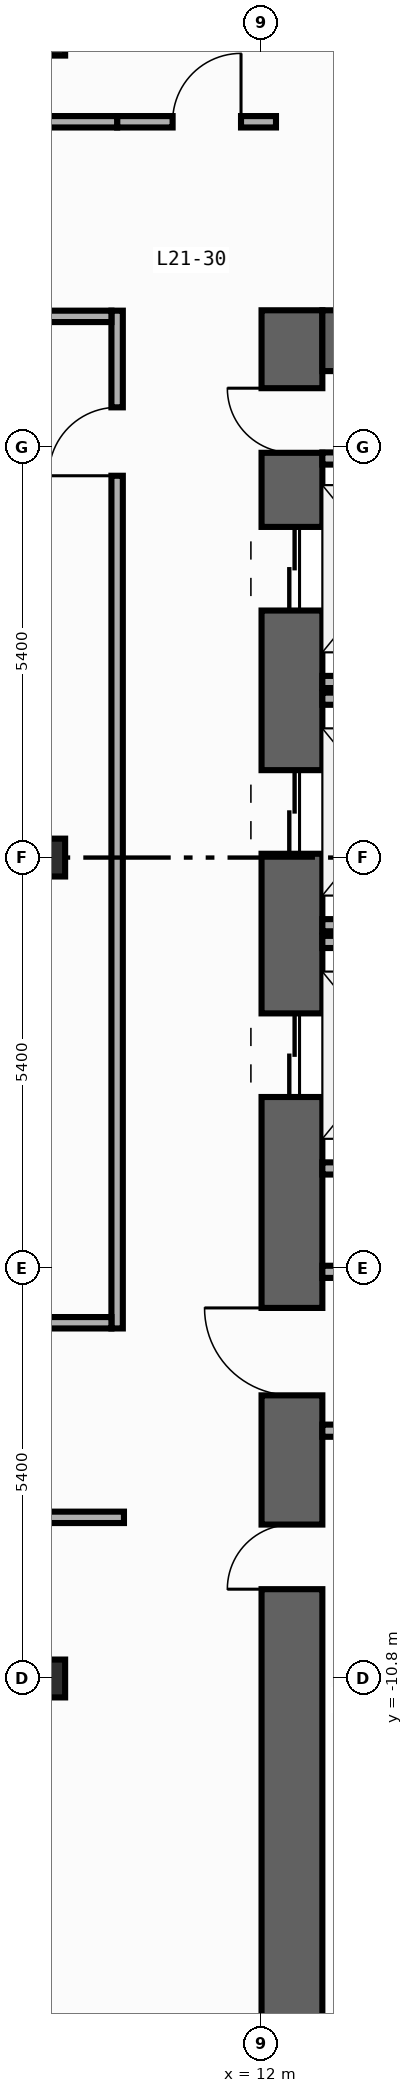
"""IFC4 building model, lengths in metres.
Left out: names, types, materials, properties, quantities, classifications, styles, units other than length and angle.
Written with IfcOpenShell. Run it as: python <this file> out.ifc"""

import sys

from ifc_helpers import new_model, si_unit, direction, frame, frame_2d, origin, origin_2d, place, context, subcontext, project, spatial, rectangle, i_section, extrude, element, fill, save


model = new_model("IFC4")
c1 = context("Model", 3, precision=1e-05, world=origin(), true_north=direction((0.0, 1.0)))
c2 = subcontext(c1, "Body", "Model", "MODEL_VIEW")
j1 = project(units=[si_unit("LENGTHUNIT", "METRE"), si_unit("PLANEANGLEUNIT", "RADIAN")], contexts=[c1])
p1 = place(None, origin())
s1 = spatial("IfcSite", under=j1, at=p1, CompositionType="ELEMENT")
p2 = place(p1, origin())
s2 = spatial("IfcBuilding", under=s1, at=p2, CompositionType="ELEMENT")
p3 = place(p2, frame((0.0, 0.0, 93.2)))
s3 = spatial("IfcBuildingStorey", under=s2, at=p3, CompositionType="ELEMENT", Elevation=93.2)
p4 = place(p3, frame((12.4, -19.8, 0.0), z_axis=(0.0, 0.0, 1.0), x_axis=(0.0, 1.0, 0.0)))
e1 = element("IfcWall", 1, at=p4, inside=s3, PredefinedType="SHEAR", context=c2, shape_type="SweptSolid", body=[
    extrude(rectangle(XDim=27.0, YDim=0.8, at=frame_2d((13.5, 0.0))), origin(), (0.0, 0.0, 1.0), 3.94),
])
p5 = place(p4, frame((23.05, 0.0, 0.0)))
e2 = element("IfcOpeningElement", 2, at=p5, cuts=e1, PredefinedType="OPENING", context=c2, shape_type="SweptSolid", body=[
    extrude(rectangle(XDim=1.1, YDim=2.2, at=frame_2d((0.55, 1.1))), frame((0.0, 0.41, 0.0), z_axis=(0.0, -1.0, 0.0), x_axis=(1.0, 0.0, 0.0)), (0.0, 0.0, 1.0), 0.82),
])
p6 = place(p4, frame((19.85, 0.0, 0.0)))
e3 = element("IfcOpeningElement", 3, at=p6, cuts=e1, PredefinedType="OPENING", context=c2, shape_type="SweptSolid", body=[
    extrude(rectangle(XDim=1.1, YDim=2.2, at=frame_2d((0.55, 1.1))), frame((0.0, 0.41, 0.0), z_axis=(0.0, -1.0, 0.0), x_axis=(1.0, 0.0, 0.0)), (0.0, 0.0, 1.0), 0.82),
])
p7 = place(p4, frame((16.65, 0.0, 0.0)))
e4 = element("IfcOpeningElement", 4, at=p7, cuts=e1, PredefinedType="OPENING", context=c2, shape_type="SweptSolid", body=[
    extrude(rectangle(XDim=1.1, YDim=2.2, at=frame_2d((0.55, 1.1))), frame((0.0, 0.41, 0.0), z_axis=(0.0, -1.0, 0.0), x_axis=(1.0, 0.0, 0.0)), (0.0, 0.0, 1.0), 0.82),
])
p8 = place(p4, frame((10.175, 0.0, 0.0)))
e5 = element("IfcOpeningElement", 5, at=p8, cuts=e1, PredefinedType="OPENING", context=c2, shape_type="SweptSolid", body=[
    extrude(rectangle(XDim=0.85, YDim=2.1, at=frame_2d((0.425, 1.05))), frame((0.0, 0.41, 0.0), z_axis=(0.0, -1.0, 0.0), x_axis=(1.0, 0.0, 0.0)), (0.0, 0.0, 1.0), 0.82),
])
p9 = place(p4, frame((12.725, 0.0, 0.0)))
e6 = element("IfcOpeningElement", 6, at=p9, cuts=e1, PredefinedType="OPENING", context=c2, shape_type="SweptSolid", body=[
    extrude(rectangle(XDim=1.15, YDim=2.2, at=frame_2d((0.575, 1.1))), frame((0.0, 0.41, 0.0), z_axis=(0.0, -1.0, 0.0), x_axis=(1.0, 0.0, 0.0)), (0.0, 0.0, 1.0), 0.82),
])
p10 = place(p4, frame((25.125, 0.0, 0.0)))
e7 = element("IfcOpeningElement", 7, at=p10, cuts=e1, PredefinedType="OPENING", context=c2, shape_type="SweptSolid", body=[
    extrude(rectangle(XDim=0.85, YDim=2.1, at=frame_2d((0.425, 1.05))), frame((0.0, 0.41, 0.0), z_axis=(0.0, -1.0, 0.0), x_axis=(1.0, 0.0, 0.0)), (0.0, 0.0, 1.0), 0.82),
])
p11 = place(p3, frame((12.8, 6.8, 0.0), z_axis=(0.0, 0.0, 1.0), x_axis=(1.0, 0.0, 0.0)))
e8 = element("IfcWall", 8, at=p11, inside=s3, PredefinedType="SHEAR", context=c2, shape_type="SweptSolid", body=[
    extrude(rectangle(XDim=6.8, YDim=0.8, at=frame_2d((3.4, 0.0))), origin(), (0.0, 0.0, 1.0), 3.94),
])
for number, where, z_axis, x_axis in (
    (9, (9.2, -10.8, 0.0), (0.0, 0.0, 1.0), (1.0, 0.0, 0.0)),
    (10, (9.2, 0.0, 0.0), (0.0, 0.0, 1.0), (1.0, 0.0, 0.0)),
    (11, (9.2, 10.8, 0.0), (0.0, 0.0, 1.0), (1.0, 0.0, 0.0)),
):
    element("IfcColumn", number, at=place(p3, frame(where, z_axis=z_axis, x_axis=x_axis)), inside=s3, PredefinedType="COLUMN", context=c2, shape_type="SweptSolid", body=[
        extrude(i_section(OverallWidth=0.432, OverallDepth=0.498, WebThickness=0.045, FlangeThickness=0.07, FilletRadius=0.022, at=origin_2d()), origin(), (0.0, 0.0, 1.0), 4.2),
    ])
for number, where, z_axis, x_axis in (
    (12, (12.8, 2.31, 0.0), (0.0, 0.0, 1.0), (1.0, 0.0, 0.0)),
    (13, (12.8, -0.89, 0.0), (0.0, 0.0, 1.0), (1.0, 0.0, 0.0)),
    (14, (12.8, 2.09, 0.0), (0.0, 0.0, 1.0), (1.0, 0.0, 0.0)),
    (15, (12.8, -4.09, 0.0), (0.0, 0.0, 1.0), (1.0, 0.0, 0.0)),
    (16, (12.8, -1.11, 0.0), (0.0, 0.0, 1.0), (1.0, 0.0, 0.0)),
):
    element("IfcWall", number, at=place(p3, frame(where, z_axis=z_axis, x_axis=x_axis)), inside=s3, PredefinedType="STANDARD", context=c2, shape_type="SweptSolid", body=[
        extrude(rectangle(XDim=2.19, YDim=0.16, at=frame_2d((1.095, 0.0))), origin(), (0.0, 0.0, 1.0), 3.94),
    ])
for number, where, z_axis, x_axis in (
    (17, (12.8, -5.45, 0.0), (0.0, 0.0, 1.0), (1.0, 0.0, 0.0)),
    (18, (12.8, -7.54, 0.0), (0.0, 0.0, 1.0), (1.0, 0.0, 0.0)),
    (19, (12.8, 5.25, 0.0), (0.0, 0.0, 1.0), (1.0, 0.0, 0.0)),
):
    element("IfcWall", number, at=place(p3, frame(where, z_axis=z_axis, x_axis=x_axis)), inside=s3, PredefinedType="STANDARD", context=c2, shape_type="SweptSolid", body=[
        extrude(rectangle(XDim=2.6, YDim=0.16, at=frame_2d((1.3, 0.0))), origin(), (0.0, 0.0, 1.0), 3.94),
    ])
p12 = place(p3, frame((10.1, -6.195, 0.0), z_axis=(0.0, 0.0, 1.0), x_axis=(0.0, 1.0, 0.0)))
e20 = element("IfcWall", 20, at=p12, inside=s3, PredefinedType="PARTITIONING", context=c2, shape_type="SweptSolid", body=[
    extrude(rectangle(XDim=13.39, YDim=0.15, at=frame_2d((6.695, 0.0))), origin(), (0.0, 0.0, 1.0), 3.94),
])
p13 = place(p12, frame((11.218, 0.0, 0.0)))
e21 = element("IfcOpeningElement", 21, at=p13, cuts=e20, PredefinedType="OPENING", context=c2, shape_type="SweptSolid", body=[
    extrude(rectangle(XDim=0.9, YDim=2.15, at=frame_2d((0.45, 1.075))), frame((0.0, 0.085, 0.0), z_axis=(0.0, -1.0, 0.0), x_axis=(1.0, 0.0, 0.0)), (0.0, 0.0, 1.0), 0.17),
])
p14 = place(p3, frame((10.1, 9.68, 0.0), z_axis=(0.0, 0.0, 1.0), x_axis=(1.0, 0.0, 0.0)))
e22 = element("IfcWall", 22, at=p14, inside=s3, PredefinedType="PARTITIONING", context=c2, shape_type="SweptSolid", body=[
    extrude(rectangle(XDim=2.09, YDim=0.15, at=frame_2d((1.045, 0.0))), origin(), (0.0, 0.0, 1.0), 3.94),
])
p15 = place(p14, frame((0.73, 0.0, 0.0)))
e23 = element("IfcOpeningElement", 23, at=p15, cuts=e22, PredefinedType="OPENING", context=c2, shape_type="SweptSolid", body=[
    extrude(rectangle(XDim=0.9, YDim=2.15, at=frame_2d((0.45, 1.075))), frame((0.0, 0.085, 0.0), z_axis=(0.0, -1.0, 0.0), x_axis=(1.0, 0.0, 0.0)), (0.0, 0.0, 1.0), 0.17),
])
p16 = place(p3, frame((-9.085, 7.12, 0.0), z_axis=(0.0, 0.0, 1.0), x_axis=(1.0, 0.0, 0.0)))
e24 = element("IfcWall", 24, at=p16, inside=s3, PredefinedType="PARTITIONING", context=c2, shape_type="SweptSolid", body=[
    extrude(rectangle(XDim=19.11, YDim=0.15, at=frame_2d((9.555, 0.0))), origin(), (0.0, 0.0, 1.0), 3.94),
])
p17 = place(p16, frame((8.703, 0.0, 0.0)))
e25 = element("IfcOpeningElement", 25, at=p17, cuts=e24, PredefinedType="OPENING", context=c2, shape_type="SweptSolid", body=[
    extrude(rectangle(XDim=0.9, YDim=2.15, at=frame_2d((0.45, 1.075))), frame((0.0, 0.085, 0.0), z_axis=(0.0, -1.0, 0.0), x_axis=(1.0, 0.0, 0.0)), (0.0, 0.0, 1.0), 0.17),
])
p18 = place(p3, frame((-0.02, 9.68, 0.0), z_axis=(0.0, 0.0, 1.0), x_axis=(1.0, 0.0, 0.0)))
e26 = element("IfcWall", 26, at=p18, inside=s3, PredefinedType="PARTITIONING", context=c2, shape_type="SweptSolid", body=[
    extrude(rectangle(XDim=10.12, YDim=0.15, at=frame_2d((5.06, 0.0))), origin(), (0.0, 0.0, 1.0), 3.94),
])
p19 = place(p18, frame((0.46, 0.0, 0.0)))
e27 = element("IfcOpeningElement", 27, at=p19, cuts=e26, PredefinedType="OPENING", context=c2, shape_type="SweptSolid", body=[
    extrude(rectangle(XDim=0.9, YDim=2.15, at=frame_2d((0.45, 1.075))), frame((0.0, 0.085, 0.0), z_axis=(0.0, -1.0, 0.0), x_axis=(1.0, 0.0, 0.0)), (0.0, 0.0, 1.0), 0.17),
])
p20 = place(p3, frame((-9.085, -6.12, 0.0), z_axis=(0.0, 0.0, 1.0), x_axis=(1.0, 0.0, 0.0)))
e28 = element("IfcWall", 28, at=p20, inside=s3, PredefinedType="PARTITIONING", context=c2, shape_type="SweptSolid", body=[
    extrude(rectangle(XDim=19.11, YDim=0.15, at=frame_2d((9.555, 0.0))), origin(), (0.0, 0.0, 1.0), 3.94),
])
p21 = place(p20, frame((8.703, 0.0, 0.0)))
e29 = element("IfcOpeningElement", 29, at=p21, cuts=e28, PredefinedType="OPENING", context=c2, shape_type="SweptSolid", body=[
    extrude(rectangle(XDim=0.9, YDim=2.15, at=frame_2d((0.45, 1.075))), frame((0.0, 0.085, 0.0), z_axis=(0.0, -1.0, 0.0), x_axis=(1.0, 0.0, 0.0)), (0.0, 0.0, 1.0), 0.17),
])
p22 = place(p3, frame((5.88, -8.68, 0.0), z_axis=(0.0, 0.0, 1.0), x_axis=(1.0, 0.0, 0.0)))
e30 = element("IfcWall", 30, at=p22, inside=s3, PredefinedType="PARTITIONING", context=c2, shape_type="SweptSolid", body=[
    extrude(rectangle(XDim=4.31, YDim=0.15, at=frame_2d((2.155, 0.0))), origin(), (0.0, 0.0, 1.0), 3.94),
])
p23 = place(p22, frame((0.46, 0.0, 0.0)))
e31 = element("IfcOpeningElement", 31, at=p23, cuts=e30, PredefinedType="OPENING", context=c2, shape_type="SweptSolid", body=[
    extrude(rectangle(XDim=0.9, YDim=2.15, at=frame_2d((0.45, 1.075))), frame((0.0, 0.085, 0.0), z_axis=(0.0, -1.0, 0.0), x_axis=(1.0, 0.0, 0.0)), (0.0, 0.0, 1.0), 0.17),
])
p24 = place(p5, origin())
e32 = element("IfcDoor", 32, at=p24, inside=s3, OperationType="DOUBLE_DOOR_SLIDING", PredefinedType="DOOR", context=c2, shape_type="SweptSolid", body=[
    extrude(rectangle(XDim=1.1, YDim=2.2, at=frame_2d((0.55, 1.1))), frame((0.0, 0.025, 0.0), z_axis=(0.0, -1.0, 0.0), x_axis=(1.0, 0.0, 0.0)), (0.0, 0.0, 1.0), 0.05),
])
fill(e2, e32)
p25 = place(p6, origin())
e33 = element("IfcDoor", 33, at=p25, inside=s3, OperationType="DOUBLE_DOOR_SLIDING", PredefinedType="DOOR", context=c2, shape_type="SweptSolid", body=[
    extrude(rectangle(XDim=1.1, YDim=2.2, at=frame_2d((0.55, 1.1))), frame((0.0, 0.025, 0.0), z_axis=(0.0, -1.0, 0.0), x_axis=(1.0, 0.0, 0.0)), (0.0, 0.0, 1.0), 0.05),
])
fill(e3, e33)
p26 = place(p7, origin())
e34 = element("IfcDoor", 34, at=p26, inside=s3, OperationType="DOUBLE_DOOR_SLIDING", PredefinedType="DOOR", context=c2, shape_type="SweptSolid", body=[
    extrude(rectangle(XDim=1.1, YDim=2.2, at=frame_2d((0.55, 1.1))), frame((0.0, 0.025, 0.0), z_axis=(0.0, -1.0, 0.0), x_axis=(1.0, 0.0, 0.0)), (0.0, 0.0, 1.0), 0.05),
])
fill(e4, e34)
p27 = place(p8, origin())
e35 = element("IfcDoor", 35, at=p27, inside=s3, OperationType="SINGLE_SWING_LEFT", PredefinedType="DOOR", context=c2, shape_type="SweptSolid", body=[
    extrude(rectangle(XDim=0.85, YDim=2.1, at=frame_2d((0.425, 1.05))), frame((0.0, 0.025, 0.0), z_axis=(0.0, -1.0, 0.0), x_axis=(1.0, 0.0, 0.0)), (0.0, 0.0, 1.0), 0.05),
])
fill(e5, e35)
p28 = place(p9, origin())
e36 = element("IfcDoor", 36, at=p28, inside=s3, OperationType="SINGLE_SWING_RIGHT", PredefinedType="DOOR", context=c2, shape_type="SweptSolid", body=[
    extrude(rectangle(XDim=1.15, YDim=2.2, at=frame_2d((0.575, 1.1))), frame((0.0, 0.025, 0.0), z_axis=(0.0, -1.0, 0.0), x_axis=(1.0, 0.0, 0.0)), (0.0, 0.0, 1.0), 0.05),
])
fill(e6, e36)
p29 = place(p10, origin())
e37 = element("IfcDoor", 37, at=p29, inside=s3, OperationType="SINGLE_SWING_RIGHT", PredefinedType="DOOR", context=c2, shape_type="SweptSolid", body=[
    extrude(rectangle(XDim=0.85, YDim=2.1, at=frame_2d((0.425, 1.05))), frame((0.0, 0.025, 0.0), z_axis=(0.0, -1.0, 0.0), x_axis=(1.0, 0.0, 0.0)), (0.0, 0.0, 1.0), 0.05),
])
fill(e7, e37)
p30 = place(p13, origin())
e38 = element("IfcDoor", 38, at=p30, inside=s3, OperationType="SINGLE_SWING_LEFT", PredefinedType="DOOR", context=c2, shape_type="SweptSolid", body=[
    extrude(rectangle(XDim=0.9, YDim=2.15, at=frame_2d((0.45, 1.075))), frame((0.0, 0.025, 0.0), z_axis=(0.0, -1.0, 0.0), x_axis=(1.0, 0.0, 0.0)), (0.0, 0.0, 1.0), 0.05),
])
fill(e21, e38)
p31 = place(p15, origin())
e39 = element("IfcDoor", 39, at=p31, inside=s3, OperationType="SINGLE_SWING_RIGHT", PredefinedType="DOOR", context=c2, shape_type="SweptSolid", body=[
    extrude(rectangle(XDim=0.9, YDim=2.15, at=frame_2d((0.45, 1.075))), frame((0.0, 0.025, 0.0), z_axis=(0.0, -1.0, 0.0), x_axis=(1.0, 0.0, 0.0)), (0.0, 0.0, 1.0), 0.05),
])
fill(e23, e39)
save(model, sys.argv[1])
